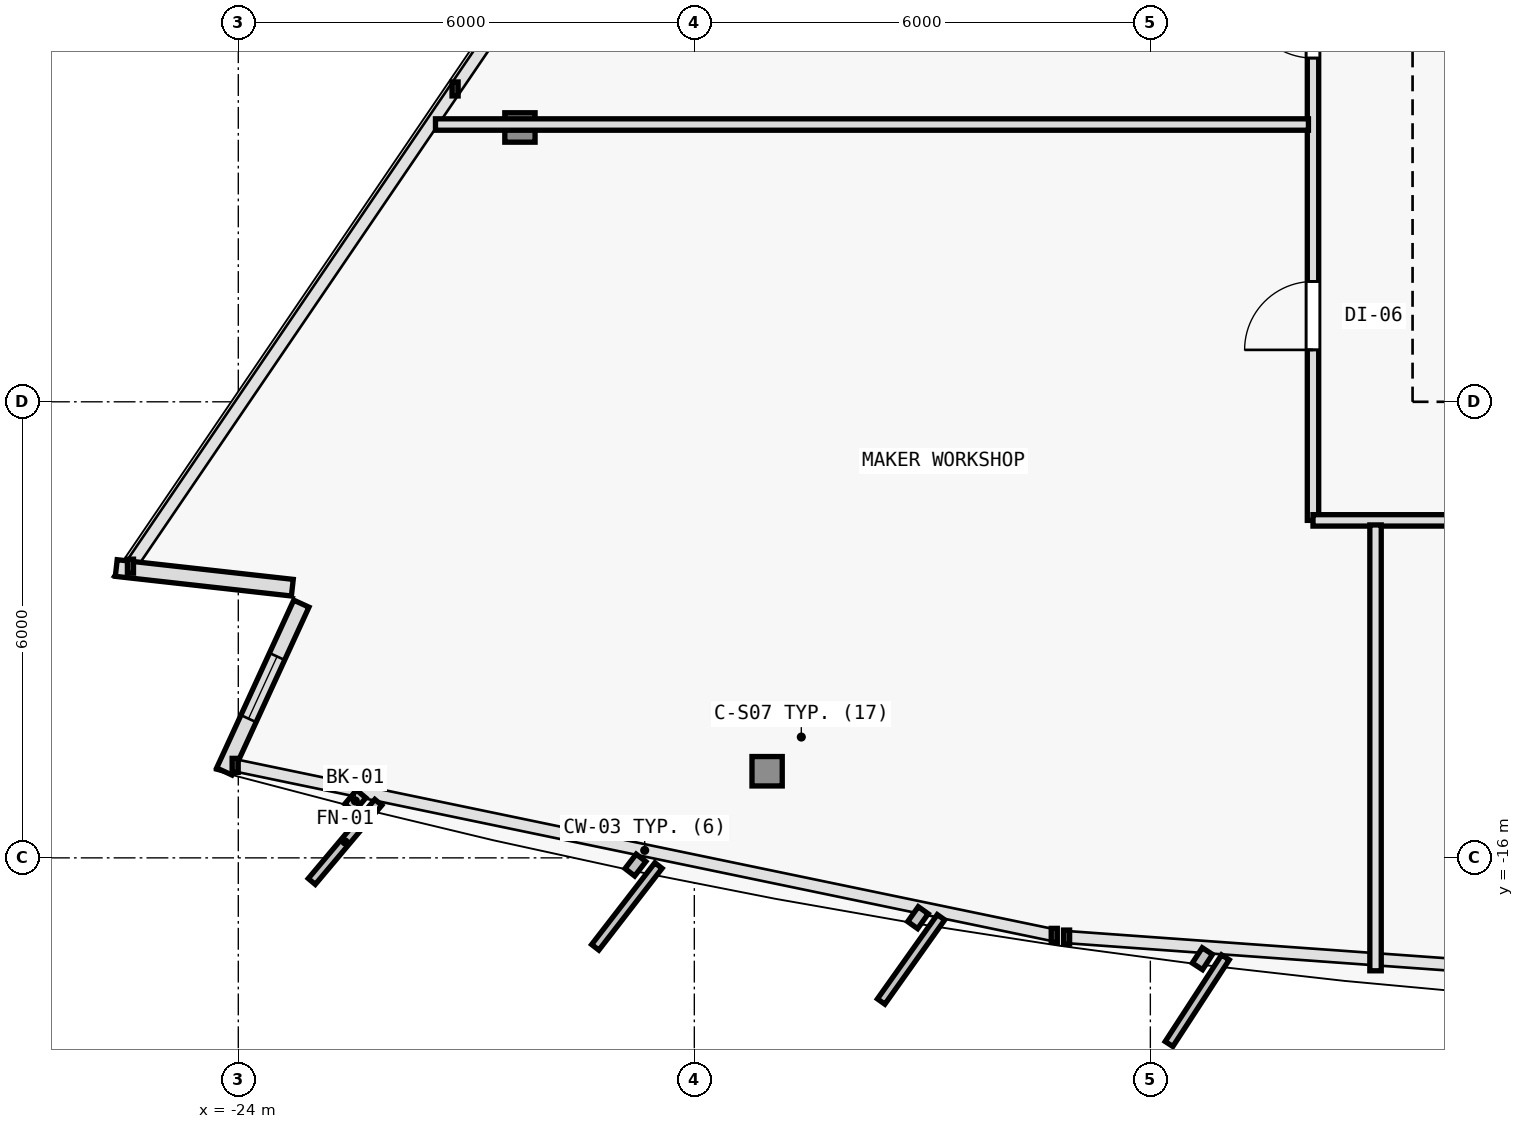
"""IFC4 building model, lengths in metres.
Left out: names, types, materials, properties, quantities, classifications, styles, units other than length and angle.
Written with IfcOpenShell. Run it as: python <this file> out.ifc"""

import sys

from ifc_helpers import new_model, si_unit, direction, frame, frame_2d, origin, origin_2d, place, context, subcontext, project, spatial, rectangle, i_section, extrude, element, fill, save


model = new_model("IFC4")
c1 = context("Model", 3, precision=1e-05, world=origin(), true_north=direction((0.0, 1.0)))
c2 = subcontext(c1, "Body", "Model", "MODEL_VIEW")
j1 = project(units=[si_unit("LENGTHUNIT", "METRE"), si_unit("PLANEANGLEUNIT", "RADIAN")], contexts=[c1])
p1 = place(None, origin())
s1 = spatial("IfcSite", under=j1, at=p1, CompositionType="ELEMENT")
p2 = place(p1, origin())
s2 = spatial("IfcBuilding", under=s1, at=p2, CompositionType="ELEMENT")
p3 = place(p2, frame((0.0, 0.0, 194.7)))
s3 = spatial("IfcBuildingStorey", under=s2, at=p3, CompositionType="ELEMENT", Elevation=194.7)
p4 = place(p3, frame((-17.042, -14.86, 0.006), z_axis=(0.020596292833, 0.033511459955, 0.999226087917), x_axis=(-0.851954850327, 0.523615252838, 0.0)))
e1 = element("IfcColumn", 1, at=p4, inside=s3, PredefinedType="COLUMN", context=c2, shape_type="SweptSolid", body=[
    extrude(i_section(OverallWidth=0.398, OverallDepth=0.387, WebThickness=0.013, FlangeThickness=0.022, FilletRadius=0.015, at=origin_2d()), origin(), (0.0, 0.0, 1.0), 3.592),
])
p5 = place(p3, frame((-20.294, -6.391, 0.006), z_axis=(0.025224163578, 0.021620711639, 0.999447990843), x_axis=(-0.650791373456, 0.759256602365, 0.0)))
e2 = element("IfcColumn", 2, at=p5, inside=s3, PredefinedType="COLUMN", context=c2, shape_type="SweptSolid", body=[
    extrude(i_section(OverallWidth=0.398, OverallDepth=0.387, WebThickness=0.013, FlangeThickness=0.022, FilletRadius=0.015, at=origin_2d()), origin(), (0.0, 0.0, 1.0), 3.591),
])
p6 = place(p3, frame((-23.289, -12.446, 0.0), z_axis=(0.0, 0.0, 1.0), x_axis=(-0.993829972675, 0.110914315635, 0.0)))
e3 = element("IfcWall", 3, at=p6, inside=s3, PredefinedType="SOLIDWALL", context=c2, shape_type="SweptSolid", body=[
    extrude(rectangle(XDim=2.331, YDim=0.22, at=frame_2d((1.166, 0.0))), origin(), (0.0, 0.0, 1.0), 3.35),
])
p7 = place(p3, frame((-24.185, -14.863, 0.0), z_axis=(0.0, 0.0, 1.0), x_axis=(0.417509141111, 0.90867272276, 0.0)))
e4 = element("IfcWall", 4, at=p7, inside=s3, PredefinedType="SOLIDWALL", context=c2, shape_type="SweptSolid", body=[
    extrude(rectangle(XDim=2.43, YDim=0.22, at=frame_2d((1.215, 0.0))), origin(), (0.0, 0.0, 1.0), 3.35),
])
p8 = place(p7, frame((0.765, 0.0, 0.62)))
e5 = element("IfcOpeningElement", 5, at=p8, cuts=e4, PredefinedType="OPENING", context=c2, shape_type="SweptSolid", body=[
    extrude(rectangle(XDim=0.9, YDim=1.6, at=frame_2d((0.45, 0.8))), frame((0.0, 0.12, 0.0), z_axis=(0.0, -1.0, 0.0), x_axis=(1.0, 0.0, 0.0)), (0.0, 0.0, 1.0), 0.24),
])
p9 = place(p3, frame((-9.86, -11.56, 0.0), z_axis=(0.0, 0.0, 1.0), x_axis=(0.0, 1.0, 0.0)))
e6 = element("IfcWall", 6, at=p9, inside=s3, PredefinedType="PARTITIONING", context=c2, shape_type="SweptSolid", body=[
    extrude(rectangle(XDim=19.986, YDim=0.15, at=frame_2d((9.993, 0.0))), origin(), (0.0, 0.0, 1.0), 2.825),
])
p10 = place(p9, frame((10.94, 0.0, 0.0)))
e7 = element("IfcOpeningElement", 7, at=p10, cuts=e6, PredefinedType="OPENING", context=c2, shape_type="SweptSolid", body=[
    extrude(rectangle(XDim=0.9, YDim=2.1, at=frame_2d((0.45, 1.05))), frame((0.0, 0.085, 0.0), z_axis=(0.0, -1.0, 0.0), x_axis=(1.0, 0.0, 0.0)), (0.0, 0.0, 1.0), 0.17),
])
p11 = place(p9, frame((8.643, 0.0, 0.0)))
e8 = element("IfcOpeningElement", 8, at=p11, cuts=e6, PredefinedType="OPENING", context=c2, shape_type="SweptSolid", body=[
    extrude(rectangle(XDim=0.9, YDim=2.1, at=frame_2d((0.45, 1.05))), frame((0.0, 0.085, 0.0), z_axis=(0.0, -1.0, 0.0), x_axis=(1.0, 0.0, 0.0)), (0.0, 0.0, 1.0), 0.17),
])
p12 = place(p9, frame((6.082, 0.0, 0.0)))
e9 = element("IfcOpeningElement", 9, at=p12, cuts=e6, PredefinedType="OPENING", context=c2, shape_type="SweptSolid", body=[
    extrude(rectangle(XDim=0.9, YDim=2.1, at=frame_2d((0.45, 1.05))), frame((0.0, 0.085, 0.0), z_axis=(0.0, -1.0, 0.0), x_axis=(1.0, 0.0, 0.0)), (0.0, 0.0, 1.0), 0.17),
])
p13 = place(p9, frame((2.243, 0.0, 0.0)))
e10 = element("IfcOpeningElement", 10, at=p13, cuts=e6, PredefinedType="OPENING", context=c2, shape_type="SweptSolid", body=[
    extrude(rectangle(XDim=0.9, YDim=2.1, at=frame_2d((0.45, 1.05))), frame((0.0, 0.085, 0.0), z_axis=(0.0, -1.0, 0.0), x_axis=(1.0, 0.0, 0.0)), (0.0, 0.0, 1.0), 0.17),
])
p14 = place(p9, frame((17.092, 0.0, 0.0)))
e11 = element("IfcOpeningElement", 11, at=p14, cuts=e6, PredefinedType="OPENING", context=c2, shape_type="SweptSolid", body=[
    extrude(rectangle(XDim=0.9, YDim=2.1, at=frame_2d((0.45, 1.05))), frame((0.0, 0.085, 0.0), z_axis=(0.0, -1.0, 0.0), x_axis=(1.0, 0.0, 0.0)), (0.0, 0.0, 1.0), 0.17),
])
p15 = place(p9, frame((13.413, 0.0, 0.0)))
e12 = element("IfcOpeningElement", 12, at=p15, cuts=e6, PredefinedType="OPENING", context=c2, shape_type="SweptSolid", body=[
    extrude(rectangle(XDim=0.9, YDim=2.1, at=frame_2d((0.45, 1.05))), frame((0.0, 0.085, 0.0), z_axis=(0.0, -1.0, 0.0), x_axis=(1.0, 0.0, 0.0)), (0.0, 0.0, 1.0), 0.17),
])
p16 = place(p3, frame((13.18, -11.56, 0.0), z_axis=(0.0, 0.0, 1.0), x_axis=(-1.0, 0.0, 0.0)))
e13 = element("IfcWall", 13, at=p16, inside=s3, PredefinedType="PARTITIONING", context=c2, shape_type="SweptSolid", body=[
    extrude(rectangle(XDim=23.04, YDim=0.15, at=frame_2d((11.52, 0.0))), origin(), (0.0, 0.0, 1.0), 2.825),
])
p17 = place(p16, frame((14.399, 0.0, 0.0)))
e14 = element("IfcOpeningElement", 14, at=p17, cuts=e13, PredefinedType="OPENING", context=c2, shape_type="SweptSolid", body=[
    extrude(rectangle(XDim=0.9, YDim=2.1, at=frame_2d((0.45, 1.05))), frame((0.0, 0.085, 0.0), z_axis=(0.0, -1.0, 0.0), x_axis=(1.0, 0.0, 0.0)), (0.0, 0.0, 1.0), 0.17),
])
p18 = place(p16, frame((5.905, 0.0, 0.0)))
e15 = element("IfcOpeningElement", 15, at=p18, cuts=e13, PredefinedType="OPENING", context=c2, shape_type="SweptSolid", body=[
    extrude(rectangle(XDim=0.9, YDim=2.1, at=frame_2d((0.45, 1.05))), frame((0.0, 0.085, 0.0), z_axis=(0.0, -1.0, 0.0), x_axis=(1.0, 0.0, 0.0)), (0.0, 0.0, 1.0), 0.17),
])
p19 = place(p16, frame((3.458, 0.0, 0.0)))
e16 = element("IfcOpeningElement", 16, at=p19, cuts=e13, PredefinedType="OPENING", context=c2, shape_type="SweptSolid", body=[
    extrude(rectangle(XDim=0.9, YDim=2.1, at=frame_2d((0.45, 1.05))), frame((0.0, 0.085, 0.0), z_axis=(0.0, -1.0, 0.0), x_axis=(1.0, 0.0, 0.0)), (0.0, 0.0, 1.0), 0.17),
])
p20 = place(p16, frame((0.933, 0.0, 0.0)))
e17 = element("IfcOpeningElement", 17, at=p20, cuts=e13, PredefinedType="OPENING", context=c2, shape_type="SweptSolid", body=[
    extrude(rectangle(XDim=0.9, YDim=2.1, at=frame_2d((0.45, 1.05))), frame((0.0, 0.085, 0.0), z_axis=(0.0, -1.0, 0.0), x_axis=(1.0, 0.0, 0.0)), (0.0, 0.0, 1.0), 0.17),
])
p21 = place(p3, frame((-9.92, -6.352, 0.0), z_axis=(0.0, 0.0, 1.0), x_axis=(-1.0, 0.0, 0.0)))
e18 = element("IfcWall", 18, at=p21, inside=s3, PredefinedType="PARTITIONING", context=c2, shape_type="SweptSolid", body=[
    extrude(rectangle(XDim=11.486, YDim=0.15, at=frame_2d((5.743, 0.0))), origin(), (0.0, 0.0, 1.0), 2.825),
])
p22 = place(p3, frame((-9.037, -11.62, 0.0), z_axis=(0.0, 0.0, 1.0), x_axis=(0.0, -1.0, 0.0)))
e19 = element("IfcWall", 19, at=p22, inside=s3, PredefinedType="PARTITIONING", context=c2, shape_type="SweptSolid", body=[
    extrude(rectangle(XDim=5.865, YDim=0.15, at=frame_2d((2.933, 0.0))), origin(), (0.0, 0.0, 1.0), 2.935),
])
p23 = place(p8, origin())
e20 = element("IfcWindow", 20, at=p23, inside=s3, PartitioningType="SINGLE_PANEL", PredefinedType="WINDOW", context=c2, shape_type="SweptSolid", body=[
    extrude(rectangle(XDim=0.9, YDim=1.6, at=frame_2d((0.45, 0.8))), frame((0.0, 0.03, 0.0), z_axis=(0.0, -1.0, 0.0), x_axis=(1.0, 0.0, 0.0)), (0.0, 0.0, 1.0), 0.06),
])
fill(e5, e20)
p24 = place(p12, origin())
e21 = element("IfcDoor", 21, at=p24, inside=s3, OperationType="SINGLE_SWING_RIGHT", PredefinedType="DOOR", context=c2, shape_type="SweptSolid", body=[
    extrude(rectangle(XDim=0.9, YDim=2.1, at=frame_2d((0.45, 1.05))), frame((0.0, 0.025, 0.0), z_axis=(0.0, -1.0, 0.0), x_axis=(1.0, 0.0, 0.0)), (0.0, 0.0, 1.0), 0.05),
])
fill(e9, e21)
p25 = place(p13, origin())
e22 = element("IfcDoor", 22, at=p25, inside=s3, OperationType="SINGLE_SWING_LEFT", PredefinedType="DOOR", context=c2, shape_type="SweptSolid", body=[
    extrude(rectangle(XDim=0.9, YDim=2.1, at=frame_2d((0.45, 1.05))), frame((0.0, 0.025, 0.0), z_axis=(0.0, -1.0, 0.0), x_axis=(1.0, 0.0, 0.0)), (0.0, 0.0, 1.0), 0.05),
])
fill(e10, e22)
save(model, sys.argv[1])
